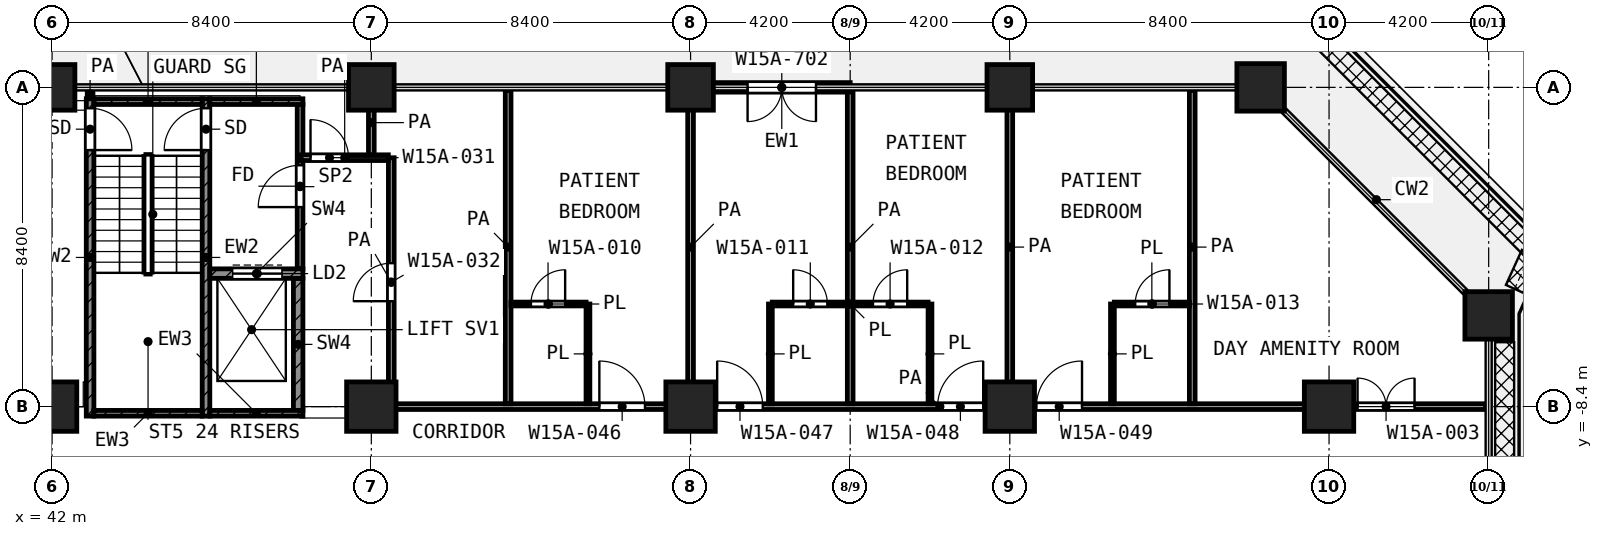
"""IFC4 building model, lengths in metres.
Left out: names, types, materials, properties, quantities, classifications, styles, units other than length and angle.
Written with IfcOpenShell. Run it as: python <this file> out.ifc"""

import sys

from ifc_helpers import new_model, si_unit, direction, frame, frame_2d, origin, origin_2d, place, context, subcontext, project, spatial, rectangle, extrude, element, fill, save


model = new_model("IFC4")
c1 = context("Model", 3, precision=1e-05, world=origin(), true_north=direction((0.0, 1.0)))
c2 = subcontext(c1, "Body", "Model", "MODEL_VIEW")
j1 = project(units=[si_unit("LENGTHUNIT", "METRE"), si_unit("PLANEANGLEUNIT", "RADIAN")], contexts=[c1])
p1 = place(None, origin())
s1 = spatial("IfcSite", under=j1, at=p1, CompositionType="ELEMENT")
p2 = place(p1, origin())
s2 = spatial("IfcBuilding", under=s1, at=p2, CompositionType="ELEMENT")
p3 = place(p2, frame((0.0, 0.0, 68.6)))
s3 = spatial("IfcBuildingStorey", under=s2, at=p3, CompositionType="ELEMENT", Elevation=68.6)
for number, where, z_axis, x_axis in (
    (1, (42.0, 0.0, 0.0), (0.0, 0.0, 1.0), (1.0, 0.0, 0.0)),
    (2, (50.4, 0.0, 0.0), (0.0, 0.0, 1.0), (1.0, 0.0, 0.0)),
    (3, (58.8, 0.0, 0.0), (0.0, 0.0, 1.0), (1.0, 0.0, 0.0)),
    (4, (67.2, 0.0, 0.0), (0.0, 0.0, 1.0), (1.0, 0.0, 0.0)),
):
    element("IfcColumn", number, at=place(p3, frame(where, z_axis=z_axis, x_axis=x_axis)), inside=s3, PredefinedType="COLUMN", context=c2, shape_type="SweptSolid", body=[
        extrude(rectangle(XDim=1.2, YDim=1.2, at=origin_2d()), origin(), (0.0, 0.0, 1.0), 4.2),
    ])
for number, where, z_axis, x_axis in (
    (5, (73.8, 0.0, 0.0), (0.0, 0.0, 1.0), (1.0, 0.0, 0.0)),
    (6, (79.8, -6.0, 0.0), (0.0, 0.0, 1.0), (1.0, 0.0, 0.0)),
):
    element("IfcColumn", number, at=place(p3, frame(where, z_axis=z_axis, x_axis=x_axis)), inside=s3, PredefinedType="COLUMN", context=c2, shape_type="SweptSolid", body=[
        extrude(rectangle(XDim=1.25, YDim=1.25, at=origin_2d()), origin(), (0.0, 0.0, 1.0), 4.2),
    ])
for number, where, z_axis, x_axis in (
    (7, (42.0, -8.4, 0.0), (0.0, 0.0, 1.0), (1.0, 0.0, 0.0)),
    (8, (50.4, -8.4, 0.0), (0.0, 0.0, 1.0), (1.0, 0.0, 0.0)),
    (9, (58.8, -8.4, 0.0), (0.0, 0.0, 1.0), (1.0, 0.0, 0.0)),
    (10, (67.2, -8.4, 0.0), (0.0, 0.0, 1.0), (1.0, 0.0, 0.0)),
    (11, (75.6, -8.4, 0.0), (0.0, 0.0, 1.0), (1.0, 0.0, 0.0)),
):
    element("IfcColumn", number, at=place(p3, frame(where, z_axis=z_axis, x_axis=x_axis)), inside=s3, PredefinedType="COLUMN", context=c2, shape_type="SweptSolid", body=[
        extrude(rectangle(XDim=1.3, YDim=1.3, at=origin_2d()), origin(), (0.0, 0.0, 1.0), 4.2),
    ])
p4 = place(p3, frame((63.0, 0.0, 0.0), z_axis=(0.0, 0.0, 1.0), x_axis=(-1.0, 0.0, 0.0)))
e12 = element("IfcWall", 12, at=p4, inside=s3, PredefinedType="SOLIDWALL", context=c2, shape_type="SweptSolid", body=[
    extrude(rectangle(XDim=3.6, YDim=0.25, at=frame_2d((1.8, 0.0))), origin(), (0.0, 0.0, 1.0), 3.78),
])
p5 = place(p4, frame((0.9, 0.0, 0.0)))
e13 = element("IfcOpeningElement", 13, at=p5, cuts=e12, PredefinedType="OPENING", context=c2, shape_type="SweptSolid", body=[
    extrude(rectangle(XDim=1.8, YDim=2.1, at=frame_2d((0.9, 1.05))), frame((0.0, 0.135, 0.0), z_axis=(0.0, -1.0, 0.0), x_axis=(1.0, 0.0, 0.0)), (0.0, 0.0, 1.0), 0.27),
])
p6 = place(p3, frame((43.0, -8.65, 0.0), z_axis=(0.0, 0.0, 1.0), x_axis=(0.0, 1.0, 0.0)))
e14 = element("IfcWall", 14, at=p6, inside=s3, PredefinedType="SHEAR", context=c2, shape_type="SweptSolid", body=[
    extrude(rectangle(XDim=8.35, YDim=0.2, at=frame_2d((4.175, 0.0))), origin(), (0.0, 0.0, 1.0), 3.9),
])
p7 = place(p6, frame((7.0, 0.0, 0.0)))
e15 = element("IfcOpeningElement", 15, at=p7, cuts=e14, PredefinedType="OPENING", context=c2, shape_type="SweptSolid", body=[
    extrude(rectangle(XDim=1.1, YDim=2.1, at=frame_2d((0.55, 1.05))), frame((0.0, 0.11, 0.0), z_axis=(0.0, -1.0, 0.0), x_axis=(1.0, 0.0, 0.0)), (0.0, 0.0, 1.0), 0.22),
])
p8 = place(p3, frame((46.05, -8.65, 0.0), z_axis=(0.0, 0.0, 1.0), x_axis=(0.0, 1.0, 0.0)))
e16 = element("IfcWall", 16, at=p8, inside=s3, PredefinedType="SHEAR", context=c2, shape_type="SweptSolid", body=[
    extrude(rectangle(XDim=8.35, YDim=0.2, at=frame_2d((4.175, 0.0))), origin(), (0.0, 0.0, 1.0), 3.9),
])
p9 = place(p8, frame((7.0, 0.0, 0.0)))
e17 = element("IfcOpeningElement", 17, at=p9, cuts=e16, PredefinedType="OPENING", context=c2, shape_type="SweptSolid", body=[
    extrude(rectangle(XDim=1.1, YDim=2.1, at=frame_2d((0.55, 1.05))), frame((0.0, 0.11, 0.0), z_axis=(0.0, -1.0, 0.0), x_axis=(1.0, 0.0, 0.0)), (0.0, 0.0, 1.0), 0.22),
])
p10 = place(p3, frame((43.1, -0.375, 0.0), z_axis=(0.0, 0.0, 1.0), x_axis=(1.0, 0.0, 0.0)))
e18 = element("IfcWall", 18, at=p10, inside=s3, PredefinedType="SHEAR", context=c2, shape_type="SweptSolid", body=[
    extrude(rectangle(XDim=2.85, YDim=0.15, at=frame_2d((1.425, 0.0))), origin(), (0.0, 0.0, 1.0), 3.9),
])
p11 = place(p3, frame((46.15, -0.375, 0.0), z_axis=(0.0, 0.0, 1.0), x_axis=(1.0, 0.0, 0.0)))
e19 = element("IfcWall", 19, at=p11, inside=s3, PredefinedType="SHEAR", context=c2, shape_type="SweptSolid", body=[
    extrude(rectangle(XDim=2.45, YDim=0.15, at=frame_2d((1.225, 0.0))), origin(), (0.0, 0.0, 1.0), 3.9),
])
p12 = place(p3, frame((43.1, -8.575, 0.0), z_axis=(0.0, 0.0, 1.0), x_axis=(1.0, 0.0, 0.0)))
e20 = element("IfcWall", 20, at=p12, inside=s3, PredefinedType="SHEAR", context=c2, shape_type="SweptSolid", body=[
    extrude(rectangle(XDim=2.85, YDim=0.15, at=frame_2d((1.425, 0.0))), origin(), (0.0, 0.0, 1.0), 3.9),
])
p13 = place(p3, frame((46.15, -8.575, 0.0), z_axis=(0.0, 0.0, 1.0), x_axis=(1.0, 0.0, 0.0)))
e21 = element("IfcWall", 21, at=p13, inside=s3, PredefinedType="SHEAR", context=c2, shape_type="SweptSolid", body=[
    extrude(rectangle(XDim=2.45, YDim=0.15, at=frame_2d((1.225, 0.0))), origin(), (0.0, 0.0, 1.0), 3.9),
])
p14 = place(p3, frame((46.15, -4.9, 0.0), z_axis=(0.0, 0.0, 1.0), x_axis=(1.0, 0.0, 0.0)))
e22 = element("IfcWall", 22, at=p14, inside=s3, PredefinedType="SHEAR", context=c2, shape_type="SweptSolid", body=[
    extrude(rectangle(XDim=2.45, YDim=0.25, at=frame_2d((1.225, 0.0))), origin(), (0.0, 0.0, 1.0), 3.9),
])
p15 = place(p14, frame((0.6, 0.0, 0.0)))
e23 = element("IfcOpeningElement", 23, at=p15, cuts=e22, PredefinedType="OPENING", context=c2, shape_type="SweptSolid", body=[
    extrude(rectangle(XDim=1.3, YDim=2.1, at=frame_2d((0.65, 1.05))), frame((0.0, 0.135, 0.0), z_axis=(0.0, -1.0, 0.0), x_axis=(1.0, 0.0, 0.0)), (0.0, 0.0, 1.0), 0.27),
])
p16 = place(p3, frame((48.475, -8.5, 0.0), z_axis=(0.0, 0.0, 1.0), x_axis=(0.0, 1.0, 0.0)))
e24 = element("IfcWall", 24, at=p16, inside=s3, PredefinedType="SHEAR", context=c2, shape_type="SweptSolid", body=[
    extrude(rectangle(XDim=3.475, YDim=0.25, at=frame_2d((1.738, 0.0))), origin(), (0.0, 0.0, 1.0), 3.9),
])
p17 = place(p3, frame((48.525, -4.775, 0.0), z_axis=(0.0, 0.0, 1.0), x_axis=(0.0, 1.0, 0.0)))
e25 = element("IfcWall", 25, at=p17, inside=s3, PredefinedType="PARTITIONING", context=c2, shape_type="SweptSolid", body=[
    extrude(rectangle(XDim=4.325, YDim=0.15, at=frame_2d((2.163, 0.0))), origin(), (0.0, 0.0, 1.0), 3.9),
])
p18 = place(p17, frame((1.625, 0.0, 0.0)))
e26 = element("IfcOpeningElement", 26, at=p18, cuts=e25, PredefinedType="OPENING", context=c2, shape_type="SweptSolid", body=[
    extrude(rectangle(XDim=1.1, YDim=2.1, at=frame_2d((0.55, 1.05))), frame((0.0, 0.085, 0.0), z_axis=(0.0, -1.0, 0.0), x_axis=(1.0, 0.0, 0.0)), (0.0, 0.0, 1.0), 0.17),
])
p19 = place(p3, frame((54.075, -5.7, 0.0), z_axis=(0.0, 0.0, 1.0), x_axis=(1.0, 0.0, 0.0)))
e27 = element("IfcWall", 27, at=p19, inside=s3, PredefinedType="PARTITIONING", context=c2, shape_type="SweptSolid", body=[
    extrude(rectangle(XDim=1.975, YDim=0.1, at=frame_2d((0.988, 0.0))), origin(), (0.0, 0.0, 1.0), 3.9),
])
p20 = place(p19, frame((0.525, 0.0, 0.0)))
e28 = element("IfcOpeningElement", 28, at=p20, cuts=e27, PredefinedType="OPENING", context=c2, shape_type="SweptSolid", body=[
    extrude(rectangle(XDim=0.9, YDim=2.1, at=frame_2d((0.45, 1.05))), frame((0.0, 0.06, 0.0), z_axis=(0.0, -1.0, 0.0), x_axis=(1.0, 0.0, 0.0)), (0.0, 0.0, 1.0), 0.12),
])
p21 = place(p3, frame((60.95, -5.7, 0.0), z_axis=(0.0, 0.0, 1.0), x_axis=(1.0, 0.0, 0.0)))
e29 = element("IfcWall", 29, at=p21, inside=s3, PredefinedType="PARTITIONING", context=c2, shape_type="SweptSolid", body=[
    extrude(rectangle(XDim=4.1, YDim=0.1, at=frame_2d((2.05, 0.0))), origin(), (0.0, 0.0, 1.0), 3.9),
])
p22 = place(p21, frame((0.55, 0.0, 0.0)))
e30 = element("IfcOpeningElement", 30, at=p22, cuts=e29, PredefinedType="OPENING", context=c2, shape_type="SweptSolid", body=[
    extrude(rectangle(XDim=0.9, YDim=2.1, at=frame_2d((0.45, 1.05))), frame((0.0, 0.06, 0.0), z_axis=(0.0, -1.0, 0.0), x_axis=(1.0, 0.0, 0.0)), (0.0, 0.0, 1.0), 0.12),
])
p23 = place(p21, frame((2.65, 0.0, 0.0)))
e31 = element("IfcOpeningElement", 31, at=p23, cuts=e29, PredefinedType="OPENING", context=c2, shape_type="SweptSolid", body=[
    extrude(rectangle(XDim=0.9, YDim=2.1, at=frame_2d((0.45, 1.05))), frame((0.0, 0.06, 0.0), z_axis=(0.0, -1.0, 0.0), x_axis=(1.0, 0.0, 0.0)), (0.0, 0.0, 1.0), 0.12),
])
p24 = place(p3, frame((69.95, -5.7, 0.0), z_axis=(0.0, 0.0, 1.0), x_axis=(1.0, 0.0, 0.0)))
e32 = element("IfcWall", 32, at=p24, inside=s3, PredefinedType="PARTITIONING", context=c2, shape_type="SweptSolid", body=[
    extrude(rectangle(XDim=1.975, YDim=0.1, at=frame_2d((0.988, 0.0))), origin(), (0.0, 0.0, 1.0), 3.9),
])
p25 = place(p24, frame((0.55, 0.0, 0.0)))
e33 = element("IfcOpeningElement", 33, at=p25, cuts=e32, PredefinedType="OPENING", context=c2, shape_type="SweptSolid", body=[
    extrude(rectangle(XDim=0.9, YDim=2.1, at=frame_2d((0.45, 1.05))), frame((0.0, 0.06, 0.0), z_axis=(0.0, -1.0, 0.0), x_axis=(1.0, 0.0, 0.0)), (0.0, 0.0, 1.0), 0.12),
])
for number, where, z_axis, x_axis in (
    (34, (56.1, -8.325, 0.0), (0.0, 0.0, 1.0), (0.0, 1.0, 0.0)),
    (35, (60.9, -8.325, 0.0), (0.0, 0.0, 1.0), (0.0, 1.0, 0.0)),
    (36, (65.1, -8.325, 0.0), (0.0, 0.0, 1.0), (0.0, 1.0, 0.0)),
    (37, (69.9, -8.325, 0.0), (0.0, 0.0, 1.0), (0.0, 1.0, 0.0)),
):
    element("IfcWall", number, at=place(p3, frame(where, z_axis=z_axis, x_axis=x_axis)), inside=s3, PredefinedType="PARTITIONING", context=c2, shape_type="SweptSolid", body=[
        extrude(rectangle(XDim=2.625, YDim=0.1, at=frame_2d((1.312, 0.0))), origin(), (0.0, 0.0, 1.0), 3.9),
    ])
p26 = place(p3, frame((51.0, -8.4, 0.0), z_axis=(0.0, 0.0, 1.0), x_axis=(1.0, 0.0, 0.0)))
e38 = element("IfcWall", 38, at=p26, inside=s3, PredefinedType="PARTITIONING", context=c2, shape_type="SweptSolid", body=[
    extrude(rectangle(XDim=28.72, YDim=0.15, at=frame_2d((14.36, 0.0))), origin(), (0.0, 0.0, 1.0), 3.9),
])
p27 = place(p26, frame((5.4, 0.0, 0.0)))
e39 = element("IfcOpeningElement", 39, at=p27, cuts=e38, PredefinedType="OPENING", context=c2, shape_type="SweptSolid", body=[
    extrude(rectangle(XDim=1.2, YDim=2.1, at=frame_2d((0.6, 1.05))), frame((0.0, 0.085, 0.0), z_axis=(0.0, -1.0, 0.0), x_axis=(1.0, 0.0, 0.0)), (0.0, 0.0, 1.0), 0.17),
])
p28 = place(p26, frame((8.5, 0.0, 0.0)))
e40 = element("IfcOpeningElement", 40, at=p28, cuts=e38, PredefinedType="OPENING", context=c2, shape_type="SweptSolid", body=[
    extrude(rectangle(XDim=1.2, YDim=2.1, at=frame_2d((0.6, 1.05))), frame((0.0, 0.085, 0.0), z_axis=(0.0, -1.0, 0.0), x_axis=(1.0, 0.0, 0.0)), (0.0, 0.0, 1.0), 0.17),
])
p29 = place(p26, frame((14.3, 0.0, 0.0)))
e41 = element("IfcOpeningElement", 41, at=p29, cuts=e38, PredefinedType="OPENING", context=c2, shape_type="SweptSolid", body=[
    extrude(rectangle(XDim=1.2, YDim=2.1, at=frame_2d((0.6, 1.05))), frame((0.0, 0.085, 0.0), z_axis=(0.0, -1.0, 0.0), x_axis=(1.0, 0.0, 0.0)), (0.0, 0.0, 1.0), 0.17),
])
p30 = place(p26, frame((16.9, 0.0, 0.0)))
e42 = element("IfcOpeningElement", 42, at=p30, cuts=e38, PredefinedType="OPENING", context=c2, shape_type="SweptSolid", body=[
    extrude(rectangle(XDim=1.2, YDim=2.1, at=frame_2d((0.6, 1.05))), frame((0.0, 0.085, 0.0), z_axis=(0.0, -1.0, 0.0), x_axis=(1.0, 0.0, 0.0)), (0.0, 0.0, 1.0), 0.17),
])
p31 = place(p26, frame((25.35, 0.0, 0.0)))
e43 = element("IfcOpeningElement", 43, at=p31, cuts=e38, PredefinedType="OPENING", context=c2, shape_type="SweptSolid", body=[
    extrude(rectangle(XDim=1.5, YDim=2.1, at=frame_2d((0.75, 1.05))), frame((0.0, 0.085, 0.0), z_axis=(0.0, -1.0, 0.0), x_axis=(1.0, 0.0, 0.0)), (0.0, 0.0, 1.0), 0.17),
])
p32 = place(p3, frame((48.55, -1.85, 0.0), z_axis=(0.0, 0.0, 1.0), x_axis=(1.0, 0.0, 0.0)))
e44 = element("IfcWall", 44, at=p32, inside=s3, PredefinedType="PARTITIONING", context=c2, shape_type="SweptSolid", body=[
    extrude(rectangle(XDim=2.298, YDim=0.15, at=frame_2d((1.149, 0.0))), origin(), (0.0, 0.0, 1.0), 3.9),
])
p33 = place(p32, frame((0.25, 0.0, 0.0)))
e45 = element("IfcOpeningElement", 45, at=p33, cuts=e44, PredefinedType="OPENING", context=c2, shape_type="SweptSolid", body=[
    extrude(rectangle(XDim=1.0, YDim=2.1, at=frame_2d((0.5, 1.05))), frame((0.0, 0.085, 0.0), z_axis=(0.0, -1.0, 0.0), x_axis=(1.0, 0.0, 0.0)), (0.0, 0.0, 1.0), 0.17),
])
p34 = place(p3, frame((43.0, -0.27, 0.0), z_axis=(0.0, 0.0, 1.0), x_axis=(0.0, 1.0, 0.0)))
e46 = element("IfcWall", 46, at=p34, inside=s3, PredefinedType="PARTITIONING", context=c2, shape_type="SweptSolid", body=[
    extrude(rectangle(XDim=0.19, YDim=0.15, at=frame_2d((0.095, 0.0))), origin(), (0.0, 0.0, 1.0), 3.9),
])
p35 = place(p3, frame((50.4, -1.775, 0.0), z_axis=(0.0, 0.0, 1.0), x_axis=(0.0, 1.0, 0.0)))
e47 = element("IfcWall", 47, at=p35, inside=s3, PredefinedType="PARTITIONING", context=c2, shape_type="SweptSolid", body=[
    extrude(rectangle(XDim=1.695, YDim=0.15, at=frame_2d((0.847, 0.0))), origin(), (0.0, 0.0, 1.0), 3.9),
])
p36 = place(p3, frame((50.925, -8.4, 0.0), z_axis=(0.0, 0.0, 1.0), x_axis=(0.0, 1.0, 0.0)))
e48 = element("IfcWall", 48, at=p36, inside=s3, PredefinedType="PARTITIONING", context=c2, shape_type="SweptSolid", body=[
    extrude(rectangle(XDim=6.548, YDim=0.15, at=frame_2d((3.274, 0.0))), origin(), (0.0, 0.0, 1.0), 3.9),
])
p37 = place(p36, frame((2.774, 0.0, 0.0)))
e49 = element("IfcOpeningElement", 49, at=p37, cuts=e48, PredefinedType="OPENING", context=c2, shape_type="SweptSolid", body=[
    extrude(rectangle(XDim=1.0, YDim=2.1, at=frame_2d((0.5, 1.05))), frame((0.0, 0.085, 0.0), z_axis=(0.0, -1.0, 0.0), x_axis=(1.0, 0.0, 0.0)), (0.0, 0.0, 1.0), 0.17),
])
for number, where, z_axis, x_axis in (
    (50, (54.0, -8.325, 0.0), (0.0, 0.0, 1.0), (0.0, 1.0, 0.0)),
    (51, (58.8, -8.325, 0.0), (0.0, 0.0, 1.0), (0.0, 1.0, 0.0)),
    (52, (63.0, -8.325, 0.0), (0.0, 0.0, 1.0), (0.0, 1.0, 0.0)),
    (53, (67.2, -8.325, 0.0), (0.0, 0.0, 1.0), (0.0, 1.0, 0.0)),
    (54, (72.0, -8.325, 0.0), (0.0, 0.0, 1.0), (0.0, 1.0, 0.0)),
):
    element("IfcWall", number, at=place(p3, frame(where, z_axis=z_axis, x_axis=x_axis)), inside=s3, PredefinedType="PARTITIONING", context=c2, shape_type="SweptSolid", body=[
        extrude(rectangle(XDim=8.245, YDim=0.15, at=frame_2d((4.123, 0.0))), origin(), (0.0, 0.0, 1.0), 3.9),
    ])
p38 = place(p5, origin())
e55 = element("IfcDoor", 55, at=p38, inside=s3, OperationType="DOUBLE_DOOR_SINGLE_SWING", PredefinedType="DOOR", context=c2, shape_type="SweptSolid", body=[
    extrude(rectangle(XDim=1.8, YDim=2.1, at=frame_2d((0.9, 1.05))), frame((0.0, 0.025, 0.0), z_axis=(0.0, -1.0, 0.0), x_axis=(1.0, 0.0, 0.0)), (0.0, 0.0, 1.0), 0.05),
])
fill(e13, e55)
p39 = place(p7, frame((1.1, 0.0, 0.0), z_axis=(0.0, 0.0, 1.0), x_axis=(-1.0, 0.0, 0.0)))
e56 = element("IfcDoor", 56, at=p39, inside=s3, OperationType="SINGLE_SWING_LEFT", PredefinedType="DOOR", context=c2, shape_type="SweptSolid", body=[
    extrude(rectangle(XDim=1.1, YDim=2.1, at=frame_2d((0.55, 1.05))), frame((0.0, 0.025, 0.0), z_axis=(0.0, -1.0, 0.0), x_axis=(1.0, 0.0, 0.0)), (0.0, 0.0, 1.0), 0.05),
])
fill(e15, e56)
p40 = place(p9, origin())
e57 = element("IfcDoor", 57, at=p40, inside=s3, OperationType="SINGLE_SWING_LEFT", PredefinedType="DOOR", context=c2, shape_type="SweptSolid", body=[
    extrude(rectangle(XDim=1.1, YDim=2.1, at=frame_2d((0.55, 1.05))), frame((0.0, 0.025, 0.0), z_axis=(0.0, -1.0, 0.0), x_axis=(1.0, 0.0, 0.0)), (0.0, 0.0, 1.0), 0.05),
])
fill(e17, e57)
p41 = place(p15, origin())
e58 = element("IfcDoor", 58, at=p41, inside=s3, OperationType="DOUBLE_DOOR_SLIDING", PredefinedType="DOOR", context=c2, shape_type="SweptSolid", body=[
    extrude(rectangle(XDim=1.3, YDim=2.1, at=frame_2d((0.65, 1.05))), frame((0.0, 0.025, 0.0), z_axis=(0.0, -1.0, 0.0), x_axis=(1.0, 0.0, 0.0)), (0.0, 0.0, 1.0), 0.05),
])
fill(e23, e58)
p42 = place(p18, origin())
e59 = element("IfcDoor", 59, at=p42, inside=s3, OperationType="SINGLE_SWING_LEFT", PredefinedType="DOOR", context=c2, shape_type="SweptSolid", body=[
    extrude(rectangle(XDim=1.1, YDim=2.1, at=frame_2d((0.55, 1.05))), frame((0.0, 0.025, 0.0), z_axis=(0.0, -1.0, 0.0), x_axis=(1.0, 0.0, 0.0)), (0.0, 0.0, 1.0), 0.05),
])
fill(e26, e59)
p43 = place(p33, origin())
e60 = element("IfcDoor", 60, at=p43, inside=s3, OperationType="SINGLE_SWING_LEFT", PredefinedType="DOOR", context=c2, shape_type="SweptSolid", body=[
    extrude(rectangle(XDim=1.0, YDim=2.1, at=frame_2d((0.5, 1.05))), frame((0.0, 0.025, 0.0), z_axis=(0.0, -1.0, 0.0), x_axis=(1.0, 0.0, 0.0)), (0.0, 0.0, 1.0), 0.05),
])
fill(e45, e60)
p44 = place(p37, origin())
e61 = element("IfcDoor", 61, at=p44, inside=s3, OperationType="SINGLE_SWING_LEFT", PredefinedType="DOOR", context=c2, shape_type="SweptSolid", body=[
    extrude(rectangle(XDim=1.0, YDim=2.1, at=frame_2d((0.5, 1.05))), frame((0.0, 0.025, 0.0), z_axis=(0.0, -1.0, 0.0), x_axis=(1.0, 0.0, 0.0)), (0.0, 0.0, 1.0), 0.05),
])
fill(e49, e61)
p45 = place(p27, origin())
e62 = element("IfcDoor", 62, at=p45, inside=s3, OperationType="SINGLE_SWING_LEFT", PredefinedType="DOOR", context=c2, shape_type="SweptSolid", body=[
    extrude(rectangle(XDim=1.2, YDim=2.1, at=frame_2d((0.6, 1.05))), frame((0.0, 0.025, 0.0), z_axis=(0.0, -1.0, 0.0), x_axis=(1.0, 0.0, 0.0)), (0.0, 0.0, 1.0), 0.05),
])
fill(e39, e62)
p46 = place(p20, origin())
e63 = element("IfcDoor", 63, at=p46, inside=s3, OperationType="SINGLE_SWING_RIGHT", PredefinedType="DOOR", context=c2, shape_type="SweptSolid", body=[
    extrude(rectangle(XDim=0.9, YDim=2.1, at=frame_2d((0.45, 1.05))), frame((0.0, 0.025, 0.0), z_axis=(0.0, -1.0, 0.0), x_axis=(1.0, 0.0, 0.0)), (0.0, 0.0, 1.0), 0.05),
])
fill(e28, e63)
p47 = place(p28, origin())
e64 = element("IfcDoor", 64, at=p47, inside=s3, OperationType="SINGLE_SWING_LEFT", PredefinedType="DOOR", context=c2, shape_type="SweptSolid", body=[
    extrude(rectangle(XDim=1.2, YDim=2.1, at=frame_2d((0.6, 1.05))), frame((0.0, 0.025, 0.0), z_axis=(0.0, -1.0, 0.0), x_axis=(1.0, 0.0, 0.0)), (0.0, 0.0, 1.0), 0.05),
])
fill(e40, e64)
p48 = place(p22, origin())
e65 = element("IfcDoor", 65, at=p48, inside=s3, OperationType="SINGLE_SWING_LEFT", PredefinedType="DOOR", context=c2, shape_type="SweptSolid", body=[
    extrude(rectangle(XDim=0.9, YDim=2.1, at=frame_2d((0.45, 1.05))), frame((0.0, 0.025, 0.0), z_axis=(0.0, -1.0, 0.0), x_axis=(1.0, 0.0, 0.0)), (0.0, 0.0, 1.0), 0.05),
])
fill(e30, e65)
p49 = place(p29, origin())
e66 = element("IfcDoor", 66, at=p49, inside=s3, OperationType="SINGLE_SWING_RIGHT", PredefinedType="DOOR", context=c2, shape_type="SweptSolid", body=[
    extrude(rectangle(XDim=1.2, YDim=2.1, at=frame_2d((0.6, 1.05))), frame((0.0, 0.025, 0.0), z_axis=(0.0, -1.0, 0.0), x_axis=(1.0, 0.0, 0.0)), (0.0, 0.0, 1.0), 0.05),
])
fill(e41, e66)
p50 = place(p23, origin())
e67 = element("IfcDoor", 67, at=p50, inside=s3, OperationType="SINGLE_SWING_RIGHT", PredefinedType="DOOR", context=c2, shape_type="SweptSolid", body=[
    extrude(rectangle(XDim=0.9, YDim=2.1, at=frame_2d((0.45, 1.05))), frame((0.0, 0.025, 0.0), z_axis=(0.0, -1.0, 0.0), x_axis=(1.0, 0.0, 0.0)), (0.0, 0.0, 1.0), 0.05),
])
fill(e31, e67)
p51 = place(p30, origin())
e68 = element("IfcDoor", 68, at=p51, inside=s3, OperationType="SINGLE_SWING_RIGHT", PredefinedType="DOOR", context=c2, shape_type="SweptSolid", body=[
    extrude(rectangle(XDim=1.2, YDim=2.1, at=frame_2d((0.6, 1.05))), frame((0.0, 0.025, 0.0), z_axis=(0.0, -1.0, 0.0), x_axis=(1.0, 0.0, 0.0)), (0.0, 0.0, 1.0), 0.05),
])
fill(e42, e68)
p52 = place(p25, origin())
e69 = element("IfcDoor", 69, at=p52, inside=s3, OperationType="SINGLE_SWING_RIGHT", PredefinedType="DOOR", context=c2, shape_type="SweptSolid", body=[
    extrude(rectangle(XDim=0.9, YDim=2.1, at=frame_2d((0.45, 1.05))), frame((0.0, 0.025, 0.0), z_axis=(0.0, -1.0, 0.0), x_axis=(1.0, 0.0, 0.0)), (0.0, 0.0, 1.0), 0.05),
])
fill(e33, e69)
p53 = place(p31, origin())
e70 = element("IfcDoor", 70, at=p53, inside=s3, OperationType="DOUBLE_DOOR_SINGLE_SWING", PredefinedType="DOOR", context=c2, shape_type="SweptSolid", body=[
    extrude(rectangle(XDim=1.5, YDim=2.1, at=frame_2d((0.75, 1.05))), frame((0.0, 0.025, 0.0), z_axis=(0.0, -1.0, 0.0), x_axis=(1.0, 0.0, 0.0)), (0.0, 0.0, 1.0), 0.05),
])
fill(e43, e70)
save(model, sys.argv[1])
